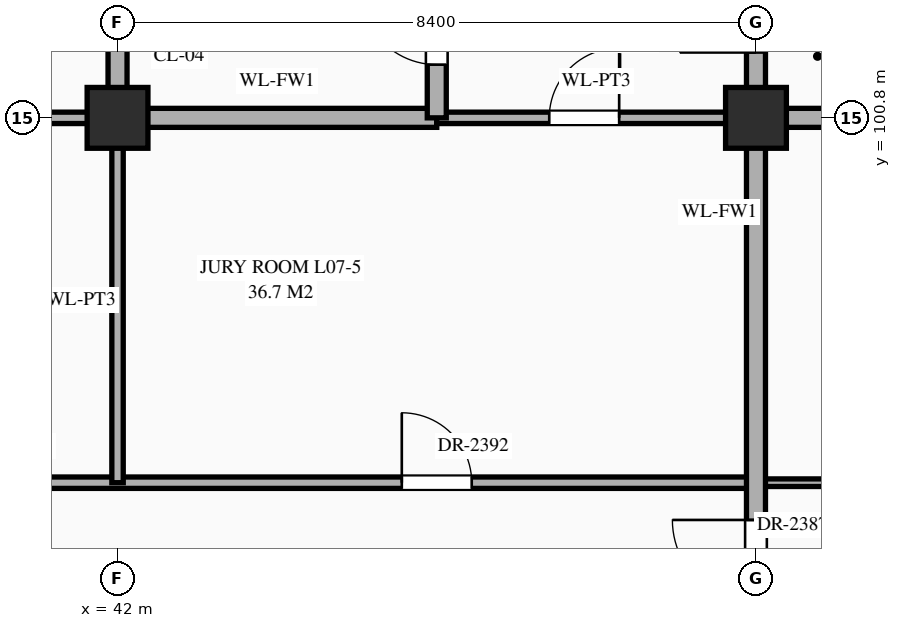
"""IFC4 building model, lengths in metres.
Left out: names, types, materials, properties, quantities, classifications, styles, units other than length and angle.
Written with IfcOpenShell. Run it as: python <this file> out.ifc"""

import sys

from ifc_helpers import new_model, si_unit, direction, frame, frame_2d, origin, origin_2d, place, context, subcontext, project, spatial, rectangle, extrude, element, fill, save


model = new_model("IFC4")
c1 = context("Model", 3, precision=1e-05, world=origin(), true_north=direction((0.0, 1.0)))
c2 = subcontext(c1, "Body", "Model", "MODEL_VIEW")
j1 = project(units=[si_unit("LENGTHUNIT", "METRE"), si_unit("PLANEANGLEUNIT", "RADIAN")], contexts=[c1])
p1 = place(None, origin())
s1 = spatial("IfcSite", under=j1, at=p1, CompositionType="ELEMENT")
p2 = place(p1, origin())
s2 = spatial("IfcBuilding", under=s1, at=p2, CompositionType="ELEMENT")
p3 = place(p2, frame((0.0, 0.0, 30.6)))
s3 = spatial("IfcBuildingStorey", under=s2, at=p3, CompositionType="ELEMENT", Elevation=30.6)
for number, where, z_axis, x_axis in (
    (1, (42.0, 100.8, 0.0), (0.0, 0.0, 1.0), (1.0, 0.0, 0.0)),
    (2, (50.4, 100.8, 0.0), (0.0, 0.0, 1.0), (1.0, 0.0, 0.0)),
):
    element("IfcColumn", number, at=place(p3, frame(where, z_axis=z_axis, x_axis=x_axis)), inside=s3, PredefinedType="COLUMN", context=c2, shape_type="SweptSolid", body=[
        extrude(rectangle(XDim=0.8, YDim=0.8, at=origin_2d()), origin(), (0.0, 0.0, 1.0), 4.5),
    ])
p4 = place(p3, frame((31.0, 96.0, 0.0), z_axis=(0.0, 0.0, 1.0), x_axis=(1.0, 0.0, 0.0)))
e3 = element("IfcWall", 3, at=p4, inside=s3, PredefinedType="STANDARD", context=c2, shape_type="SweptSolid", body=[
    extrude(rectangle(XDim=19.4, YDim=0.15, at=frame_2d((9.7, 0.0))), origin(), (0.0, 0.0, 1.0), 4.15),
])
p5 = place(p4, frame((0.85, 0.0, 0.0)))
e4 = element("IfcOpeningElement", 4, at=p5, cuts=e3, PredefinedType="OPENING", context=c2, shape_type="SweptSolid", body=[
    extrude(rectangle(XDim=0.9, YDim=2.15, at=frame_2d((0.45, 1.075))), frame((0.0, 0.087, 0.0), z_axis=(0.0, -1.0, 0.0), x_axis=(1.0, 0.0, 0.0)), (0.0, 0.0, 1.0), 0.174),
])
p6 = place(p4, frame((6.37, 0.0, 0.0)))
e5 = element("IfcOpeningElement", 5, at=p6, cuts=e3, PredefinedType="OPENING", context=c2, shape_type="SweptSolid", body=[
    extrude(rectangle(XDim=0.86, YDim=2.1, at=frame_2d((0.43, 1.05))), frame((0.0, 0.087, 0.0), z_axis=(0.0, -1.0, 0.0), x_axis=(1.0, 0.0, 0.0)), (0.0, 0.0, 1.0), 0.174),
])
p7 = place(p4, frame((14.74, 0.0, 0.0)))
e6 = element("IfcOpeningElement", 6, at=p7, cuts=e3, PredefinedType="OPENING", context=c2, shape_type="SweptSolid", body=[
    extrude(rectangle(XDim=0.92, YDim=2.15, at=frame_2d((0.46, 1.075))), frame((0.0, 0.087, 0.0), z_axis=(0.0, -1.0, 0.0), x_axis=(1.0, 0.0, 0.0)), (0.0, 0.0, 1.0), 0.174),
])
p8 = place(p3, frame((50.4, 96.0, 0.0), z_axis=(0.0, 0.0, 1.0), x_axis=(1.0, 0.0, 0.0)))
e7 = element("IfcWall", 7, at=p8, inside=s3, PredefinedType="STANDARD", context=c2, shape_type="SweptSolid", body=[
    extrude(rectangle(XDim=5.8, YDim=0.1, at=frame_2d((2.9, 0.0))), origin(), (0.0, 0.0, 1.0), 4.24),
])
p9 = place(p8, frame((1.12, 0.0, 0.0)))
e8 = element("IfcOpeningElement", 8, at=p9, cuts=e7, PredefinedType="OPENING", context=c2, shape_type="SweptSolid", body=[
    extrude(rectangle(XDim=1.16, YDim=2.3, at=frame_2d((0.58, 1.15))), frame((0.0, 0.062, 0.0), z_axis=(0.0, -1.0, 0.0), x_axis=(1.0, 0.0, 0.0)), (0.0, 0.0, 1.0), 0.124),
])
p10 = place(p8, frame((4.0, 0.0, 0.0)))
e9 = element("IfcOpeningElement", 9, at=p10, cuts=e7, PredefinedType="OPENING", context=c2, shape_type="SweptSolid", body=[
    extrude(rectangle(XDim=1.2, YDim=2.35, at=frame_2d((0.6, 1.175))), frame((0.0, 0.062, 0.0), z_axis=(0.0, -1.0, 0.0), x_axis=(1.0, 0.0, 0.0)), (0.0, 0.0, 1.0), 0.124),
])
p11 = place(p3, frame((31.0, 100.8, 0.0), z_axis=(0.0, 0.0, 1.0), x_axis=(1.0, 0.0, 0.0)))
e10 = element("IfcWall", 10, at=p11, inside=s3, PredefinedType="STANDARD", context=c2, shape_type="SweptSolid", body=[
    extrude(rectangle(XDim=11.0, YDim=0.15, at=frame_2d((5.5, 0.0))), origin(), (0.0, 0.0, 1.0), 3.3),
])
p12 = place(p11, frame((0.71, 0.0, 0.0)))
e11 = element("IfcOpeningElement", 11, at=p12, cuts=e10, PredefinedType="OPENING", context=c2, shape_type="SweptSolid", body=[
    extrude(rectangle(XDim=0.86, YDim=2.1, at=frame_2d((0.43, 1.05))), frame((0.0, 0.087, 0.0), z_axis=(0.0, -1.0, 0.0), x_axis=(1.0, 0.0, 0.0)), (0.0, 0.0, 1.0), 0.174),
])
p13 = place(p11, frame((6.34, 0.0, 0.0)))
e12 = element("IfcOpeningElement", 12, at=p13, cuts=e10, PredefinedType="OPENING", context=c2, shape_type="SweptSolid", body=[
    extrude(rectangle(XDim=0.92, YDim=2.15, at=frame_2d((0.46, 1.075))), frame((0.0, 0.087, 0.0), z_axis=(0.0, -1.0, 0.0), x_axis=(1.0, 0.0, 0.0)), (0.0, 0.0, 1.0), 0.174),
])
p14 = place(p3, frame((42.0, 100.8, 0.0), z_axis=(0.0, 0.0, 1.0), x_axis=(1.0, 0.0, 0.0)))
e13 = element("IfcWall", 13, at=p14, inside=s3, PredefinedType="STANDARD", context=c2, shape_type="SweptSolid", body=[
    extrude(rectangle(XDim=4.2, YDim=0.25, at=frame_2d((2.1, 0.0))), origin(), (0.0, 0.0, 1.0), 3.39),
])
p15 = place(p3, frame((46.2, 100.8, 0.0), z_axis=(0.0, 0.0, 1.0), x_axis=(1.0, 0.0, 0.0)))
e14 = element("IfcWall", 14, at=p15, inside=s3, PredefinedType="STANDARD", context=c2, shape_type="SweptSolid", body=[
    extrude(rectangle(XDim=4.2, YDim=0.15, at=frame_2d((2.1, 0.0))), origin(), (0.0, 0.0, 1.0), 3.39),
])
p16 = place(p15, frame((1.48, 0.0, 0.0)))
e15 = element("IfcOpeningElement", 15, at=p16, cuts=e14, PredefinedType="OPENING", context=c2, shape_type="SweptSolid", body=[
    extrude(rectangle(XDim=0.92, YDim=2.15, at=frame_2d((0.46, 1.075))), frame((0.0, 0.087, 0.0), z_axis=(0.0, -1.0, 0.0), x_axis=(1.0, 0.0, 0.0)), (0.0, 0.0, 1.0), 0.174),
])
p17 = place(p3, frame((50.4, 100.8, 0.0), z_axis=(0.0, 0.0, 1.0), x_axis=(1.0, 0.0, 0.0)))
e16 = element("IfcWall", 16, at=p17, inside=s3, PredefinedType="STANDARD", context=c2, shape_type="SweptSolid", body=[
    extrude(rectangle(XDim=3.4, YDim=0.25, at=frame_2d((1.7, 0.0))), origin(), (0.0, 0.0, 1.0), 3.39),
])
p18 = place(p17, frame((1.385, 0.0, 0.0)))
e17 = element("IfcOpeningElement", 17, at=p18, cuts=e16, PredefinedType="OPENING", context=c2, shape_type="SweptSolid", body=[
    extrude(rectangle(XDim=0.95, YDim=2.15, at=frame_2d((0.475, 1.075))), frame((0.0, 0.137, 0.0), z_axis=(0.0, -1.0, 0.0), x_axis=(1.0, 0.0, 0.0)), (0.0, 0.0, 1.0), 0.274),
])
p19 = place(p3, frame((42.0, 96.0, 0.0), z_axis=(0.0, 0.0, 1.0), x_axis=(0.0, 1.0, 0.0)))
e18 = element("IfcWall", 18, at=p19, inside=s3, PredefinedType="STANDARD", context=c2, shape_type="SweptSolid", body=[
    extrude(rectangle(XDim=4.8, YDim=0.15, at=frame_2d((2.4, 0.0))), origin(), (0.0, 0.0, 1.0), 3.4),
])
p20 = place(p3, frame((42.0, 100.8, 0.0), z_axis=(0.0, 0.0, 1.0), x_axis=(0.0, 1.0, 0.0)))
e19 = element("IfcWall", 19, at=p20, inside=s3, PredefinedType="STANDARD", context=c2, shape_type="SweptSolid", body=[
    extrude(rectangle(XDim=3.6, YDim=0.25, at=frame_2d((1.8, 0.0))), origin(), (0.0, 0.0, 1.0), 3.4),
])
p21 = place(p20, frame((0.885, 0.0, 0.0)))
e20 = element("IfcOpeningElement", 20, at=p21, cuts=e19, PredefinedType="OPENING", context=c2, shape_type="SweptSolid", body=[
    extrude(rectangle(XDim=0.95, YDim=2.15, at=frame_2d((0.475, 1.075))), frame((0.0, 0.137, 0.0), z_axis=(0.0, -1.0, 0.0), x_axis=(1.0, 0.0, 0.0)), (0.0, 0.0, 1.0), 0.274),
])
p22 = place(p3, frame((46.2, 100.8, 0.0), z_axis=(0.0, 0.0, 1.0), x_axis=(0.0, 1.0, 0.0)))
e21 = element("IfcWall", 21, at=p22, inside=s3, PredefinedType="STANDARD", context=c2, shape_type="SweptSolid", body=[
    extrude(rectangle(XDim=3.6, YDim=0.25, at=frame_2d((1.8, 0.0))), origin(), (0.0, 0.0, 1.0), 3.89),
])
p23 = place(p22, frame((0.7, 0.0, 0.0)))
e22 = element("IfcOpeningElement", 22, at=p23, cuts=e21, PredefinedType="OPENING", context=c2, shape_type="SweptSolid", body=[
    extrude(rectangle(XDim=1.0, YDim=2.2, at=frame_2d((0.5, 1.1))), frame((0.0, 0.137, 0.0), z_axis=(0.0, -1.0, 0.0), x_axis=(1.0, 0.0, 0.0)), (0.0, 0.0, 1.0), 0.274),
])
p24 = place(p3, frame((50.4, 91.2, 0.0), z_axis=(0.0, 0.0, 1.0), x_axis=(0.0, 1.0, 0.0)))
e23 = element("IfcWall", 23, at=p24, inside=s3, PredefinedType="STANDARD", context=c2, shape_type="SweptSolid", body=[
    extrude(rectangle(XDim=13.2, YDim=0.25, at=frame_2d((6.6, 0.0))), origin(), (0.0, 0.0, 1.0), 3.49),
])
p25 = place(p24, frame((0.565, 0.0, 0.0)))
e24 = element("IfcOpeningElement", 24, at=p25, cuts=e23, PredefinedType="OPENING", context=c2, shape_type="SweptSolid", body=[
    extrude(rectangle(XDim=0.95, YDim=2.15, at=frame_2d((0.475, 1.075))), frame((0.0, 0.137, 0.0), z_axis=(0.0, -1.0, 0.0), x_axis=(1.0, 0.0, 0.0)), (0.0, 0.0, 1.0), 0.274),
])
p26 = place(p24, frame((10.46, 0.0, 0.0)))
e25 = element("IfcOpeningElement", 25, at=p26, cuts=e23, PredefinedType="OPENING", context=c2, shape_type="SweptSolid", body=[
    extrude(rectangle(XDim=1.0, YDim=2.2, at=frame_2d((0.5, 1.1))), frame((0.0, 0.137, 0.0), z_axis=(0.0, -1.0, 0.0), x_axis=(1.0, 0.0, 0.0)), (0.0, 0.0, 1.0), 0.274),
])
p27 = place(p24, frame((3.21, 0.0, 0.0)))
e26 = element("IfcOpeningElement", 26, at=p27, cuts=e23, PredefinedType="OPENING", context=c2, shape_type="SweptSolid", body=[
    extrude(rectangle(XDim=1.1, YDim=2.2, at=frame_2d((0.55, 1.1))), frame((0.0, 0.137, 0.0), z_axis=(0.0, -1.0, 0.0), x_axis=(1.0, 0.0, 0.0)), (0.0, 0.0, 1.0), 0.274),
])
p28 = place(p23, origin())
e27 = element("IfcDoor", 27, at=p28, inside=s3, OperationType="SINGLE_SWING_RIGHT", PredefinedType="DOOR", context=c2, shape_type="SweptSolid", body=[
    extrude(rectangle(XDim=1.0, YDim=2.2, at=frame_2d((0.5, 1.1))), frame((0.0, 0.025, 0.0), z_axis=(0.0, -1.0, 0.0), x_axis=(1.0, 0.0, 0.0)), (0.0, 0.0, 1.0), 0.05),
])
fill(e22, e27)
p29 = place(p16, origin())
e28 = element("IfcDoor", 28, at=p29, inside=s3, OperationType="SINGLE_SWING_RIGHT", PredefinedType="DOOR", context=c2, shape_type="SweptSolid", body=[
    extrude(rectangle(XDim=0.92, YDim=2.15, at=frame_2d((0.46, 1.075))), frame((0.0, 0.025, 0.0), z_axis=(0.0, -1.0, 0.0), x_axis=(1.0, 0.0, 0.0)), (0.0, 0.0, 1.0), 0.05),
])
fill(e15, e28)
p30 = place(p27, origin())
e29 = element("IfcDoor", 29, at=p30, inside=s3, OperationType="SINGLE_SWING_RIGHT", PredefinedType="DOOR", context=c2, shape_type="SweptSolid", body=[
    extrude(rectangle(XDim=1.1, YDim=2.2, at=frame_2d((0.55, 1.1))), frame((0.0, 0.025, 0.0), z_axis=(0.0, -1.0, 0.0), x_axis=(1.0, 0.0, 0.0)), (0.0, 0.0, 1.0), 0.05),
])
fill(e26, e29)
p31 = place(p7, origin())
e30 = element("IfcDoor", 30, at=p31, inside=s3, OperationType="SINGLE_SWING_LEFT", PredefinedType="DOOR", context=c2, shape_type="SweptSolid", body=[
    extrude(rectangle(XDim=0.92, YDim=2.15, at=frame_2d((0.46, 1.075))), frame((0.0, 0.025, 0.0), z_axis=(0.0, -1.0, 0.0), x_axis=(1.0, 0.0, 0.0)), (0.0, 0.0, 1.0), 0.05),
])
fill(e6, e30)
save(model, sys.argv[1])
